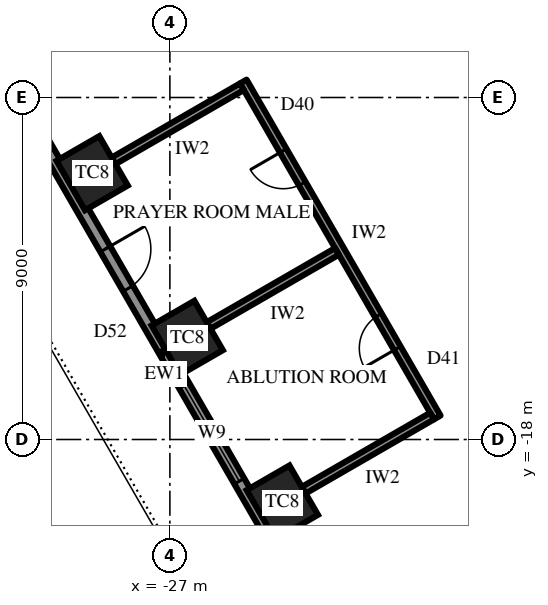
"""IFC4 building model, lengths in metres.
Left out: names, types, materials, properties, quantities, classifications, styles, units other than length and angle.
Written with IfcOpenShell. Run it as: python <this file> out.ifc"""

import sys

from ifc_helpers import new_model, si_unit, direction, frame, frame_2d, origin, origin_2d, place, context, subcontext, project, spatial, rectangle, extrude, element, fill, save


model = new_model("IFC4")
c1 = context("Model", 3, precision=1e-05, world=origin(), true_north=direction((0.0, 1.0)))
c2 = subcontext(c1, "Body", "Model", "MODEL_VIEW")
j1 = project(units=[si_unit("LENGTHUNIT", "METRE"), si_unit("PLANEANGLEUNIT", "RADIAN")], contexts=[c1])
p1 = place(None, origin())
s1 = spatial("IfcSite", under=j1, at=p1, CompositionType="ELEMENT")
p2 = place(p1, origin())
s2 = spatial("IfcBuilding", under=s1, at=p2, CompositionType="ELEMENT")
p3 = place(p2, frame((0.0, 0.0, 186.7)))
s3 = spatial("IfcBuildingStorey", under=s2, at=p3, CompositionType="ELEMENT", Elevation=186.7)
for number, where, z_axis, x_axis in (
    (1, (-29.045, -10.992, 0.0), (0.0, 0.0, 1.0), (0.5, -0.866, 0.0)),
    (2, (-26.544, -15.325, 0.0), (0.0, 0.0, 1.0), (0.5, -0.866, 0.0)),
    (3, (-24.042, -19.658, 0.0), (0.0, 0.0, 1.0), (0.5, -0.866, 0.0)),
):
    element("IfcColumn", number, at=place(p3, frame(where, z_axis=z_axis, x_axis=x_axis)), inside=s3, PredefinedType="COLUMN", context=c2, shape_type="SweptSolid", body=[
        extrude(rectangle(XDim=1.5, YDim=1.3, at=origin_2d()), origin(), (0.0, 0.0, 1.0), 4.2),
    ])
p4 = place(p3, frame((-34.656, -2.675, 0.0), z_axis=(0.0, 0.0, 1.0), x_axis=(0.500003084452, -0.866023622968, 0.0)))
e4 = element("IfcWall", 4, at=p4, inside=s3, PredefinedType="SOLIDWALL", context=c2, shape_type="SweptSolid", body=[
    extrude(rectangle(XDim=30.022, YDim=0.3, at=frame_2d((15.011, 0.0))), origin(), (0.0, 0.0, 1.0), 2.75),
])
p5 = place(p4, frame((1.052, 0.0, 0.6)))
e5 = element("IfcOpeningElement", 5, at=p5, cuts=e4, PredefinedType="OPENING", context=c2, shape_type="SweptSolid", body=[
    extrude(rectangle(XDim=2.9, YDim=1.9, at=frame_2d((1.45, 0.95))), frame((0.0, 0.16, 0.0), z_axis=(0.0, -1.0, 0.0), x_axis=(1.0, 0.0, 0.0)), (0.0, 0.0, 1.0), 0.32),
])
p6 = place(p4, frame((6.056, 0.0, 0.6)))
e6 = element("IfcOpeningElement", 6, at=p6, cuts=e4, PredefinedType="OPENING", context=c2, shape_type="SweptSolid", body=[
    extrude(rectangle(XDim=2.9, YDim=1.9, at=frame_2d((1.45, 0.95))), frame((0.0, 0.16, 0.0), z_axis=(0.0, -1.0, 0.0), x_axis=(1.0, 0.0, 0.0)), (0.0, 0.0, 1.0), 0.32),
])
p7 = place(p4, frame((11.909, 0.0, 0.0)))
e7 = element("IfcOpeningElement", 7, at=p7, cuts=e4, PredefinedType="OPENING", context=c2, shape_type="SweptSolid", body=[
    extrude(rectangle(XDim=1.2, YDim=2.4, at=frame_2d((0.6, 1.2))), frame((0.0, 0.16, 0.0), z_axis=(0.0, -1.0, 0.0), x_axis=(1.0, 0.0, 0.0)), (0.0, 0.0, 1.0), 0.32),
])
p8 = place(p4, frame((16.063, 0.0, 0.6)))
e8 = element("IfcOpeningElement", 8, at=p8, cuts=e4, PredefinedType="OPENING", context=c2, shape_type="SweptSolid", body=[
    extrude(rectangle(XDim=2.9, YDim=1.9, at=frame_2d((1.45, 0.95))), frame((0.0, 0.16, 0.0), z_axis=(0.0, -1.0, 0.0), x_axis=(1.0, 0.0, 0.0)), (0.0, 0.0, 1.0), 0.32),
])
p9 = place(p4, frame((21.067, 0.0, 0.6)))
e9 = element("IfcOpeningElement", 9, at=p9, cuts=e4, PredefinedType="OPENING", context=c2, shape_type="SweptSolid", body=[
    extrude(rectangle(XDim=2.9, YDim=1.9, at=frame_2d((1.45, 0.95))), frame((0.0, 0.16, 0.0), z_axis=(0.0, -1.0, 0.0), x_axis=(1.0, 0.0, 0.0)), (0.0, 0.0, 1.0), 0.32),
])
p10 = place(p4, frame((26.07, 0.0, 0.6)))
e10 = element("IfcOpeningElement", 10, at=p10, cuts=e4, PredefinedType="OPENING", context=c2, shape_type="SweptSolid", body=[
    extrude(rectangle(XDim=2.9, YDim=1.9, at=frame_2d((1.45, 0.95))), frame((0.0, 0.16, 0.0), z_axis=(0.0, -1.0, 0.0), x_axis=(1.0, 0.0, 0.0)), (0.0, 0.0, 1.0), 0.32),
])
p11 = place(p3, frame((-25.069, -8.58, 0.0), z_axis=(0.0, 0.0, 1.0), x_axis=(0.500005407604, -0.86602228168, 0.0)))
e11 = element("IfcWall", 11, at=p11, inside=s3, PredefinedType="PARTITIONING", context=c2, shape_type="SweptSolid", body=[
    extrude(rectangle(XDim=10.208, YDim=0.2, at=frame_2d((5.104, 0.0))), origin(), (0.0, 0.0, 1.0), 4.0),
])
p12 = place(p11, frame((2.102, 0.0, 0.0)))
e12 = element("IfcOpeningElement", 12, at=p12, cuts=e11, PredefinedType="OPENING", context=c2, shape_type="SweptSolid", body=[
    extrude(rectangle(XDim=1.0, YDim=2.2, at=frame_2d((0.5, 1.1))), frame((0.0, 0.11, 0.0), z_axis=(0.0, -1.0, 0.0), x_axis=(1.0, 0.0, 0.0)), (0.0, 0.0, 1.0), 0.22),
])
p13 = place(p11, frame((7.105, 0.0, 0.0)))
e13 = element("IfcOpeningElement", 13, at=p13, cuts=e11, PredefinedType="OPENING", context=c2, shape_type="SweptSolid", body=[
    extrude(rectangle(XDim=1.0, YDim=2.2, at=frame_2d((0.5, 1.1))), frame((0.0, 0.11, 0.0), z_axis=(0.0, -1.0, 0.0), x_axis=(1.0, 0.0, 0.0)), (0.0, 0.0, 1.0), 0.22),
])
p14 = place(p3, frame((-25.105, -8.717, 0.0), z_axis=(0.0, 0.0, 1.0), x_axis=(-0.866000020948, -0.500043961785, 0.0)))
e14 = element("IfcWall", 14, at=p14, inside=s3, PredefinedType="PARTITIONING", context=c2, shape_type="SweptSolid", body=[
    extrude(rectangle(XDim=3.9, YDim=0.2, at=frame_2d((1.95, 0.0))), origin(), (0.0, 0.0, 1.0), 3.082),
])
p15 = place(p3, frame((-22.603, -13.05, 0.0), z_axis=(0.0, 0.0, 1.0), x_axis=(-0.866027128446, -0.499997012787, 0.0)))
e15 = element("IfcWall", 15, at=p15, inside=s3, PredefinedType="PARTITIONING", context=c2, shape_type="SweptSolid", body=[
    extrude(rectangle(XDim=3.9, YDim=0.2, at=frame_2d((1.95, 0.0))), origin(), (0.0, 0.0, 1.0), 4.0),
])
p16 = place(p3, frame((-20.101, -17.383, 0.0), z_axis=(0.0, 0.0, 1.0), x_axis=(-0.866042777325, -0.499969906938, 0.0)))
e16 = element("IfcWall", 16, at=p16, inside=s3, PredefinedType="PARTITIONING", context=c2, shape_type="SweptSolid", body=[
    extrude(rectangle(XDim=3.9, YDim=0.2, at=frame_2d((1.95, 0.0))), origin(), (0.0, 0.0, 1.0), 3.082),
])
p17 = place(p7, origin())
e17 = element("IfcDoor", 17, at=p17, inside=s3, OperationType="SINGLE_SWING_RIGHT", PredefinedType="DOOR", context=c2, shape_type="SweptSolid", body=[
    extrude(rectangle(XDim=1.2, YDim=2.4, at=frame_2d((0.6, 1.2))), frame((0.0, 0.025, 0.0), z_axis=(0.0, -1.0, 0.0), x_axis=(1.0, 0.0, 0.0)), (0.0, 0.0, 1.0), 0.05),
])
fill(e7, e17)
p18 = place(p8, origin())
e18 = element("IfcWindow", 18, at=p18, inside=s3, PartitioningType="SINGLE_PANEL", PredefinedType="WINDOW", context=c2, shape_type="SweptSolid", body=[
    extrude(rectangle(XDim=2.9, YDim=1.9, at=frame_2d((1.45, 0.95))), frame((0.0, 0.03, 0.0), z_axis=(0.0, -1.0, 0.0), x_axis=(1.0, 0.0, 0.0)), (0.0, 0.0, 1.0), 0.06),
])
fill(e8, e18)
p19 = place(p12, frame((1.0, 0.0, 0.0), z_axis=(0.0, 0.0, 1.0), x_axis=(-1.0, 0.0, 0.0)))
e19 = element("IfcDoor", 19, at=p19, inside=s3, OperationType="SINGLE_SWING_LEFT", PredefinedType="DOOR", context=c2, shape_type="SweptSolid", body=[
    extrude(rectangle(XDim=1.0, YDim=2.2, at=frame_2d((0.5, 1.1))), frame((0.0, 0.025, 0.0), z_axis=(0.0, -1.0, 0.0), x_axis=(1.0, 0.0, 0.0)), (0.0, 0.0, 1.0), 0.05),
])
fill(e12, e19)
p20 = place(p13, frame((1.0, 0.0, 0.0), z_axis=(0.0, 0.0, 1.0), x_axis=(-1.0, 0.0, 0.0)))
e20 = element("IfcDoor", 20, at=p20, inside=s3, OperationType="SINGLE_SWING_RIGHT", PredefinedType="DOOR", context=c2, shape_type="SweptSolid", body=[
    extrude(rectangle(XDim=1.0, YDim=2.2, at=frame_2d((0.5, 1.1))), frame((0.0, 0.025, 0.0), z_axis=(0.0, -1.0, 0.0), x_axis=(1.0, 0.0, 0.0)), (0.0, 0.0, 1.0), 0.05),
])
fill(e13, e20)
save(model, sys.argv[1])
